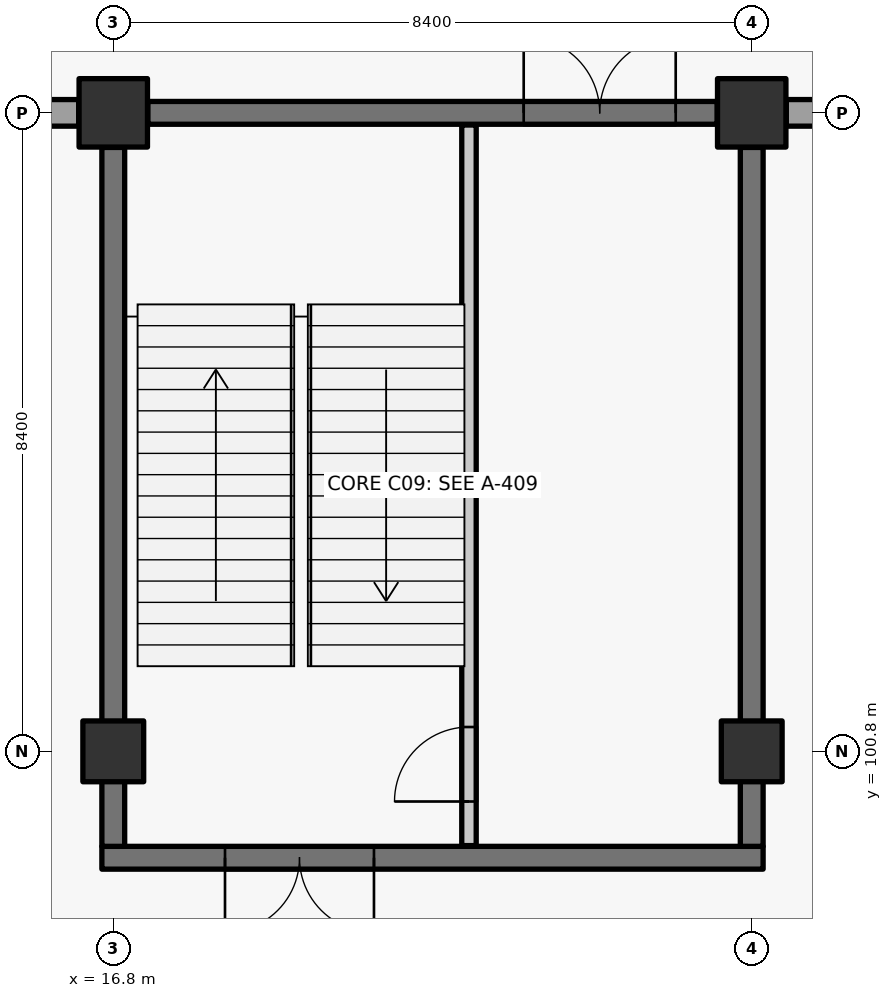
"""IFC4 building model, lengths in metres.
Left out: names, types, materials, properties, quantities, classifications, styles, units other than length and angle.
Written with IfcOpenShell. Run it as: python <this file> out.ifc"""

import sys

from ifc_helpers import new_model, si_unit, direction, frame, frame_2d, origin, origin_2d, place, context, subcontext, project, spatial, rectangle, extrude, element, fill, save


model = new_model("IFC4")
c1 = context("Model", 3, precision=1e-05, world=origin(), true_north=direction((0.0, 1.0)))
c2 = subcontext(c1, "Body", "Model", "MODEL_VIEW")
j1 = project(units=[si_unit("LENGTHUNIT", "METRE"), si_unit("PLANEANGLEUNIT", "RADIAN")], contexts=[c1])
p1 = place(None, origin())
s1 = spatial("IfcSite", under=j1, at=p1, CompositionType="ELEMENT")
p2 = place(p1, origin())
s2 = spatial("IfcBuilding", under=s1, at=p2, CompositionType="ELEMENT")
p3 = place(p2, origin())
s3 = spatial("IfcBuildingStorey", under=s2, at=p3, CompositionType="ELEMENT", Elevation=0.0)
p4 = place(p3, frame((16.8, 100.8, -0.36), z_axis=(0.0, 0.0, 1.0), x_axis=(1.0, 0.0, 0.0)))
e1 = element("IfcColumn", 1, at=p4, inside=s3, PredefinedType="COLUMN", context=c2, shape_type="SweptSolid", body=[
    extrude(rectangle(XDim=0.8, YDim=0.8, at=origin_2d()), origin(), (0.0, 0.0, 1.0), 6.36),
])
p5 = place(p3, frame((16.8, 109.2, -0.36), z_axis=(0.0, 0.0, 1.0), x_axis=(1.0, 0.0, 0.0)))
e2 = element("IfcColumn", 2, at=p5, inside=s3, PredefinedType="COLUMN", context=c2, shape_type="SweptSolid", body=[
    extrude(rectangle(XDim=0.9, YDim=0.9, at=origin_2d()), origin(), (0.0, 0.0, 1.0), 6.36),
])
p6 = place(p3, frame((25.2, 100.8, -0.36), z_axis=(0.0, 0.0, 1.0), x_axis=(1.0, 0.0, 0.0)))
e3 = element("IfcColumn", 3, at=p6, inside=s3, PredefinedType="COLUMN", context=c2, shape_type="SweptSolid", body=[
    extrude(rectangle(XDim=0.8, YDim=0.8, at=origin_2d()), origin(), (0.0, 0.0, 1.0), 6.36),
])
p7 = place(p3, frame((25.2, 109.2, -0.36), z_axis=(0.0, 0.0, 1.0), x_axis=(1.0, 0.0, 0.0)))
e4 = element("IfcColumn", 4, at=p7, inside=s3, PredefinedType="COLUMN", context=c2, shape_type="SweptSolid", body=[
    extrude(rectangle(XDim=0.9, YDim=0.9, at=origin_2d()), origin(), (0.0, 0.0, 1.0), 6.36),
])
p8 = place(p3, frame((8.855, 109.2, 0.0), z_axis=(0.0, 0.0, 1.0), x_axis=(1.0, 0.0, 0.0)))
e5 = element("IfcWall", 5, at=p8, inside=s3, PredefinedType="SOLIDWALL", context=c2, shape_type="SweptSolid", body=[
    extrude(rectangle(XDim=7.49, YDim=0.35, at=frame_2d((3.745, 0.0))), origin(), (0.0, 0.0, 1.0), 5.19),
])
p9 = place(p8, frame((1.945, 0.0, 1.4)))
e6 = element("IfcOpeningElement", 6, at=p9, cuts=e5, PredefinedType="OPENING", context=c2, shape_type="SweptSolid", body=[
    extrude(rectangle(XDim=3.6, YDim=1.35, at=frame_2d((1.8, 0.675))), frame((0.0, 0.185, 0.0), z_axis=(0.0, -1.0, 0.0), x_axis=(1.0, 0.0, 0.0)), (0.0, 0.0, 1.0), 0.37),
])
p10 = place(p3, frame((25.655, 109.2, 0.0), z_axis=(0.0, 0.0, 1.0), x_axis=(1.0, 0.0, 0.0)))
e7 = element("IfcWall", 7, at=p10, inside=s3, PredefinedType="SOLIDWALL", context=c2, shape_type="SweptSolid", body=[
    extrude(rectangle(XDim=7.49, YDim=0.35, at=frame_2d((3.745, 0.0))), origin(), (0.0, 0.0, 1.0), 5.19),
])
p11 = place(p10, frame((1.945, 0.0, 1.4)))
e8 = element("IfcOpeningElement", 8, at=p11, cuts=e7, PredefinedType="OPENING", context=c2, shape_type="SweptSolid", body=[
    extrude(rectangle(XDim=3.6, YDim=1.35, at=frame_2d((1.8, 0.675))), frame((0.0, 0.185, 0.0), z_axis=(0.0, -1.0, 0.0), x_axis=(1.0, 0.0, 0.0)), (0.0, 0.0, 1.0), 0.37),
])
p12 = place(p3, frame((25.35, 99.4, -0.36), z_axis=(0.0, 0.0, 1.0), x_axis=(-1.0, 0.0, 0.0)))
e9 = element("IfcWall", 9, at=p12, inside=s3, PredefinedType="SHEAR", context=c2, shape_type="SweptSolid", body=[
    extrude(rectangle(XDim=8.7, YDim=0.3, at=frame_2d((4.35, 0.0))), origin(), (0.0, 0.0, 1.0), 6.08),
])
p13 = place(p12, frame((5.12, 0.0, 0.36)))
e10 = element("IfcOpeningElement", 10, at=p13, cuts=e9, PredefinedType="OPENING", context=c2, shape_type="SweptSolid", body=[
    extrude(rectangle(XDim=1.96, YDim=2.2, at=frame_2d((0.98, 1.1))), frame((0.0, 0.16, 0.0), z_axis=(0.0, -1.0, 0.0), x_axis=(1.0, 0.0, 0.0)), (0.0, 0.0, 1.0), 0.32),
])
p14 = place(p3, frame((16.8, 99.55, -0.36), z_axis=(0.0, 0.0, 1.0), x_axis=(0.0, 1.0, 0.0)))
e11 = element("IfcWall", 11, at=p14, inside=s3, PredefinedType="SHEAR", context=c2, shape_type="SweptSolid", body=[
    extrude(rectangle(XDim=9.195, YDim=0.3, at=frame_2d((4.598, 0.0))), origin(), (0.0, 0.0, 1.0), 6.08),
])
p15 = place(p3, frame((17.255, 109.2, -0.36), z_axis=(0.0, 0.0, 1.0), x_axis=(1.0, 0.0, 0.0)))
e12 = element("IfcWall", 12, at=p15, inside=s3, PredefinedType="SHEAR", context=c2, shape_type="SweptSolid", body=[
    extrude(rectangle(XDim=7.49, YDim=0.3, at=frame_2d((3.745, 0.0))), origin(), (0.0, 0.0, 1.0), 6.08),
])
p16 = place(p15, frame((4.945, 0.0, 0.36)))
e13 = element("IfcOpeningElement", 13, at=p16, cuts=e12, PredefinedType="OPENING", context=c2, shape_type="SweptSolid", body=[
    extrude(rectangle(XDim=2.0, YDim=2.28, at=frame_2d((1.0, 1.14))), frame((0.0, 0.16, 0.0), z_axis=(0.0, -1.0, 0.0), x_axis=(1.0, 0.0, 0.0)), (0.0, 0.0, 1.0), 0.32),
])
p17 = place(p3, frame((25.2, 108.745, -0.36), z_axis=(0.0, 0.0, 1.0), x_axis=(0.0, -1.0, 0.0)))
e14 = element("IfcWall", 14, at=p17, inside=s3, PredefinedType="SHEAR", context=c2, shape_type="SweptSolid", body=[
    extrude(rectangle(XDim=9.195, YDim=0.3, at=frame_2d((4.598, 0.0))), origin(), (0.0, 0.0, 1.0), 6.08),
])
p18 = place(p3, frame((21.48, 99.56, -0.36), z_axis=(0.0, 0.0, 1.0), x_axis=(0.0, 1.0, 0.0)))
e15 = element("IfcWall", 15, at=p18, inside=s3, PredefinedType="SOLIDWALL", context=c2, shape_type="SweptSolid", body=[
    extrude(rectangle(XDim=9.48, YDim=0.19, at=frame_2d((4.74, 0.0))), origin(), (0.0, 0.0, 1.0), 6.08),
])
p19 = place(p18, frame((0.58, 0.0, 0.36)))
e16 = element("IfcOpeningElement", 16, at=p19, cuts=e15, PredefinedType="OPENING", context=c2, shape_type="SweptSolid", body=[
    extrude(rectangle(XDim=0.98, YDim=2.15, at=frame_2d((0.49, 1.075))), frame((0.0, 0.105, 0.0), z_axis=(0.0, -1.0, 0.0), x_axis=(1.0, 0.0, 0.0)), (0.0, 0.0, 1.0), 0.21),
])
p20 = place(p19, origin())
e17 = element("IfcDoor", 17, at=p20, inside=s3, OperationType="SINGLE_SWING_LEFT", PredefinedType="DOOR", context=c2, shape_type="SweptSolid", body=[
    extrude(rectangle(XDim=0.98, YDim=2.15, at=frame_2d((0.49, 1.075))), frame((0.0, 0.025, 0.0), z_axis=(0.0, -1.0, 0.0), x_axis=(1.0, 0.0, 0.0)), (0.0, 0.0, 1.0), 0.05),
])
fill(e16, e17)
p21 = place(p13, origin())
e18 = element("IfcDoor", 18, at=p21, inside=s3, OperationType="DOUBLE_DOOR_SINGLE_SWING", PredefinedType="DOOR", context=c2, shape_type="SweptSolid", body=[
    extrude(rectangle(XDim=1.96, YDim=2.2, at=frame_2d((0.98, 1.1))), frame((0.0, 0.025, 0.0), z_axis=(0.0, -1.0, 0.0), x_axis=(1.0, 0.0, 0.0)), (0.0, 0.0, 1.0), 0.05),
])
fill(e10, e18)
p22 = place(p16, origin())
e19 = element("IfcDoor", 19, at=p22, inside=s3, OperationType="DOUBLE_DOOR_SINGLE_SWING", PredefinedType="DOOR", context=c2, shape_type="SweptSolid", body=[
    extrude(rectangle(XDim=2.0, YDim=2.28, at=frame_2d((1.0, 1.14))), frame((0.0, 0.025, 0.0), z_axis=(0.0, -1.0, 0.0), x_axis=(1.0, 0.0, 0.0)), (0.0, 0.0, 1.0), 0.05),
])
fill(e13, e19)
save(model, sys.argv[1])
